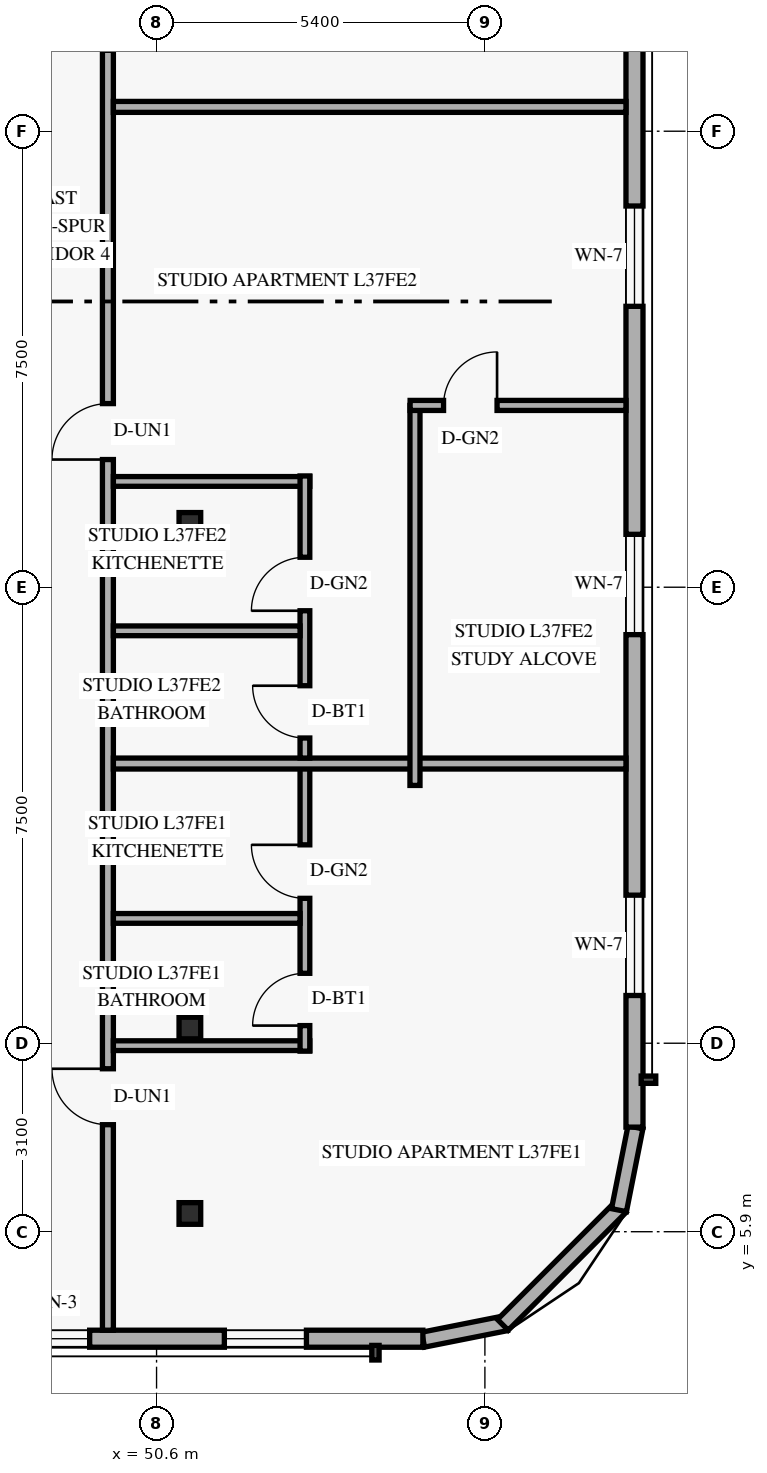
"""IFC4 building model, lengths in metres.
Left out: names, types, materials, properties, quantities, classifications, styles, units other than length and angle.
Written with IfcOpenShell. Run it as: python <this file> out.ifc"""

import sys

from ifc_helpers import new_model, si_unit, direction, frame, frame_2d, origin, origin_2d, place, context, subcontext, project, spatial, rectangle, hollow_rectangle, extrude, element, fill, save


model = new_model("IFC4")
c1 = context("Model", 3, precision=1e-05, world=origin(), true_north=direction((0.0, 1.0)))
c2 = subcontext(c1, "Body", "Model", "MODEL_VIEW")
j1 = project(units=[si_unit("LENGTHUNIT", "METRE"), si_unit("PLANEANGLEUNIT", "RADIAN")], contexts=[c1])
p1 = place(None, origin())
s1 = spatial("IfcSite", under=j1, at=p1, CompositionType="ELEMENT")
p2 = place(p1, origin())
s2 = spatial("IfcBuilding", under=s1, at=p2, CompositionType="ELEMENT")
p3 = place(p2, frame((0.0, 0.0, 144.6)))
s3 = spatial("IfcBuildingStorey", under=s2, at=p3, CompositionType="ELEMENT", Elevation=144.6)
for number, where, z_axis, x_axis in (
    (1, (51.044, 6.2, 0.0), (0.058, 0.0, 0.998), (0.0, 1.0, 0.0)),
    (2, (51.044, 9.25, 0.0), (0.058, 0.0, 0.998), (0.0, 1.0, 0.0)),
    (3, (51.044, 17.55, 0.0), (0.058, 0.0, 0.998), (0.0, 1.0, 0.0)),
):
    element("IfcColumn", number, at=place(p3, frame(where, z_axis=z_axis, x_axis=x_axis)), inside=s3, PredefinedType="COLUMN", context=c2, shape_type="SweptSolid", body=[
        extrude(hollow_rectangle(XDim=0.356, YDim=0.356, WallThickness=0.016, at=origin_2d()), origin(), (0.0, 0.0, 1.0), 3.606),
    ])
p4 = place(p3, frame((54.983, 4.124, 0.0), z_axis=(0.0, 0.0, 1.0), x_axis=(0.980809899341, 0.19496651342, 0.0)))
e4 = element("IfcWall", 4, at=p4, inside=s3, PredefinedType="SOLIDWALL", context=c2, shape_type="SweptSolid", body=[
    extrude(rectangle(XDim=1.389, YDim=0.25, at=frame_2d((0.694, 0.0))), origin(), (0.0, 0.0, 1.0), 3.36),
])
p5 = place(p3, frame((56.295, 4.368, 0.0), z_axis=(0.0, 0.0, 1.0), x_axis=(0.707106781187, 0.707106781187, 0.0)))
e5 = element("IfcWall", 5, at=p5, inside=s3, PredefinedType="SOLIDWALL", context=c2, shape_type="SweptSolid", body=[
    extrude(rectangle(XDim=2.739, YDim=0.25, at=frame_2d((1.37, 0.0))), origin(), (0.0, 0.0, 1.0), 3.36),
])
p6 = place(p3, frame((58.205, 6.254, 0.0), z_axis=(0.0, 0.0, 1.0), x_axis=(0.19496651342, 0.980809899341, 0.0)))
e6 = element("IfcWall", 6, at=p6, inside=s3, PredefinedType="SOLIDWALL", context=c2, shape_type="SweptSolid", body=[
    extrude(rectangle(XDim=1.389, YDim=0.25, at=frame_2d((0.694, 0.0))), origin(), (0.0, 0.0, 1.0), 3.36),
])
p7 = place(p3, frame((21.22, 4.14, 0.0), z_axis=(0.0, 0.0, 1.0), x_axis=(1.0, 0.0, 0.0)))
e7 = element("IfcWall", 7, at=p7, inside=s3, PredefinedType="SOLIDWALL", context=c2, shape_type="SweptSolid", body=[
    extrude(rectangle(XDim=33.76, YDim=0.28, at=frame_2d((16.88, 0.0))), origin(), (0.0, 0.0, 1.0), 3.36),
])
p8 = place(p7, frame((2.83, 0.0, 0.85)))
e8 = element("IfcOpeningElement", 8, at=p8, cuts=e7, PredefinedType="OPENING", context=c2, shape_type="SweptSolid", body=[
    extrude(rectangle(XDim=1.35, YDim=1.55, at=frame_2d((0.675, 0.775))), frame((0.0, 0.15, 0.0), z_axis=(0.0, -1.0, 0.0), x_axis=(1.0, 0.0, 0.0)), (0.0, 0.0, 1.0), 0.3),
])
p9 = place(p7, frame((9.715, 0.0, 0.85)))
e9 = element("IfcOpeningElement", 9, at=p9, cuts=e7, PredefinedType="OPENING", context=c2, shape_type="SweptSolid", body=[
    extrude(rectangle(XDim=1.35, YDim=1.55, at=frame_2d((0.675, 0.775))), frame((0.0, 0.15, 0.0), z_axis=(0.0, -1.0, 0.0), x_axis=(1.0, 0.0, 0.0)), (0.0, 0.0, 1.0), 0.3),
])
p10 = place(p7, frame((14.99, 0.0, 0.85)))
e10 = element("IfcOpeningElement", 10, at=p10, cuts=e7, PredefinedType="OPENING", context=c2, shape_type="SweptSolid", body=[
    extrude(rectangle(XDim=1.35, YDim=1.55, at=frame_2d((0.675, 0.775))), frame((0.0, 0.15, 0.0), z_axis=(0.0, -1.0, 0.0), x_axis=(1.0, 0.0, 0.0)), (0.0, 0.0, 1.0), 0.3),
])
p11 = place(p7, frame((19.55, 0.0, 0.85)))
e11 = element("IfcOpeningElement", 11, at=p11, cuts=e7, PredefinedType="OPENING", context=c2, shape_type="SweptSolid", body=[
    extrude(rectangle(XDim=1.35, YDim=1.55, at=frame_2d((0.675, 0.775))), frame((0.0, 0.15, 0.0), z_axis=(0.0, -1.0, 0.0), x_axis=(1.0, 0.0, 0.0)), (0.0, 0.0, 1.0), 0.3),
])
p12 = place(p7, frame((24.375, 0.0, 0.85)))
e12 = element("IfcOpeningElement", 12, at=p12, cuts=e7, PredefinedType="OPENING", context=c2, shape_type="SweptSolid", body=[
    extrude(rectangle(XDim=1.35, YDim=1.55, at=frame_2d((0.675, 0.775))), frame((0.0, 0.15, 0.0), z_axis=(0.0, -1.0, 0.0), x_axis=(1.0, 0.0, 0.0)), (0.0, 0.0, 1.0), 0.3),
])
p13 = place(p7, frame((27.08, 0.0, 0.85)))
e13 = element("IfcOpeningElement", 13, at=p13, cuts=e7, PredefinedType="OPENING", context=c2, shape_type="SweptSolid", body=[
    extrude(rectangle(XDim=1.2, YDim=1.5, at=frame_2d((0.6, 0.75))), frame((0.0, 0.15, 0.0), z_axis=(0.0, -1.0, 0.0), x_axis=(1.0, 0.0, 0.0)), (0.0, 0.0, 1.0), 0.3),
])
p14 = place(p7, frame((30.495, 0.0, 0.85)))
e14 = element("IfcOpeningElement", 14, at=p14, cuts=e7, PredefinedType="OPENING", context=c2, shape_type="SweptSolid", body=[
    extrude(rectangle(XDim=1.35, YDim=1.55, at=frame_2d((0.675, 0.775))), frame((0.0, 0.15, 0.0), z_axis=(0.0, -1.0, 0.0), x_axis=(1.0, 0.0, 0.0)), (0.0, 0.0, 1.0), 0.3),
])
p15 = place(p3, frame((58.46, 7.62, 0.0), z_axis=(0.0, 0.0, 1.0), x_axis=(0.0, 1.0, 0.0)))
e15 = element("IfcWall", 15, at=p15, inside=s3, PredefinedType="SOLIDWALL", context=c2, shape_type="SweptSolid", body=[
    extrude(rectangle(XDim=32.76, YDim=0.28, at=frame_2d((16.38, 0.0))), origin(), (0.0, 0.0, 1.0), 3.36),
])
p16 = place(p15, frame((2.165, 0.0, 0.85)))
e16 = element("IfcOpeningElement", 16, at=p16, cuts=e15, PredefinedType="OPENING", context=c2, shape_type="SweptSolid", body=[
    extrude(rectangle(XDim=1.65, YDim=1.6, at=frame_2d((0.825, 0.8))), frame((0.0, 0.15, 0.0), z_axis=(0.0, -1.0, 0.0), x_axis=(1.0, 0.0, 0.0)), (0.0, 0.0, 1.0), 0.3),
])
p17 = place(p15, frame((8.1, 0.0, 0.85)))
e17 = element("IfcOpeningElement", 17, at=p17, cuts=e15, PredefinedType="OPENING", context=c2, shape_type="SweptSolid", body=[
    extrude(rectangle(XDim=1.65, YDim=1.6, at=frame_2d((0.825, 0.8))), frame((0.0, 0.15, 0.0), z_axis=(0.0, -1.0, 0.0), x_axis=(1.0, 0.0, 0.0)), (0.0, 0.0, 1.0), 0.3),
])
p18 = place(p15, frame((13.5, 0.0, 0.85)))
e18 = element("IfcOpeningElement", 18, at=p18, cuts=e15, PredefinedType="OPENING", context=c2, shape_type="SweptSolid", body=[
    extrude(rectangle(XDim=1.65, YDim=1.6, at=frame_2d((0.825, 0.8))), frame((0.0, 0.15, 0.0), z_axis=(0.0, -1.0, 0.0), x_axis=(1.0, 0.0, 0.0)), (0.0, 0.0, 1.0), 0.3),
])
p19 = place(p15, frame((19.424, 0.0, 0.85)))
e19 = element("IfcOpeningElement", 19, at=p19, cuts=e15, PredefinedType="OPENING", context=c2, shape_type="SweptSolid", body=[
    extrude(rectangle(XDim=1.65, YDim=1.6, at=frame_2d((0.825, 0.8))), frame((0.0, 0.15, 0.0), z_axis=(0.0, -1.0, 0.0), x_axis=(1.0, 0.0, 0.0)), (0.0, 0.0, 1.0), 0.3),
])
p20 = place(p15, frame((24.624, 0.0, 0.85)))
e20 = element("IfcOpeningElement", 20, at=p20, cuts=e15, PredefinedType="OPENING", context=c2, shape_type="SweptSolid", body=[
    extrude(rectangle(XDim=1.65, YDim=1.6, at=frame_2d((0.825, 0.8))), frame((0.0, 0.15, 0.0), z_axis=(0.0, -1.0, 0.0), x_axis=(1.0, 0.0, 0.0)), (0.0, 0.0, 1.0), 0.3),
])
p21 = place(p15, frame((29.145, 0.0, 0.85)))
e21 = element("IfcOpeningElement", 21, at=p21, cuts=e15, PredefinedType="OPENING", context=c2, shape_type="SweptSolid", body=[
    extrude(rectangle(XDim=1.65, YDim=1.6, at=frame_2d((0.825, 0.8))), frame((0.0, 0.15, 0.0), z_axis=(0.0, -1.0, 0.0), x_axis=(1.0, 0.0, 0.0)), (0.0, 0.0, 1.0), 0.3),
])
p22 = place(p3, frame((49.8, 4.28, 0.0), z_axis=(0.0, 0.0, 1.0), x_axis=(0.0, 1.0, 0.0)))
e22 = element("IfcWall", 22, at=p22, inside=s3, PredefinedType="STANDARD", context=c2, shape_type="SweptSolid", body=[
    extrude(rectangle(XDim=39.44, YDim=0.18, at=frame_2d((19.72, 0.0))), origin(), (0.0, 0.0, 1.0), 2.73),
])
p23 = place(p22, frame((3.38, 0.0, 0.0)))
e23 = element("IfcOpeningElement", 23, at=p23, cuts=e22, PredefinedType="OPENING", context=c2, shape_type="SweptSolid", body=[
    extrude(rectangle(XDim=0.92, YDim=2.15, at=frame_2d((0.46, 1.075))), frame((0.0, 0.1, 0.0), z_axis=(0.0, -1.0, 0.0), x_axis=(1.0, 0.0, 0.0)), (0.0, 0.0, 1.0), 0.2),
])
p24 = place(p22, frame((14.32, 0.0, 0.0)))
e24 = element("IfcOpeningElement", 24, at=p24, cuts=e22, PredefinedType="OPENING", context=c2, shape_type="SweptSolid", body=[
    extrude(rectangle(XDim=0.92, YDim=2.15, at=frame_2d((0.46, 1.075))), frame((0.0, 0.1, 0.0), z_axis=(0.0, -1.0, 0.0), x_axis=(1.0, 0.0, 0.0)), (0.0, 0.0, 1.0), 0.2),
])
p25 = place(p22, frame((21.05, 0.0, 0.0)))
e25 = element("IfcOpeningElement", 25, at=p25, cuts=e22, PredefinedType="OPENING", context=c2, shape_type="SweptSolid", body=[
    extrude(rectangle(XDim=0.92, YDim=2.15, at=frame_2d((0.46, 1.075))), frame((0.0, 0.1, 0.0), z_axis=(0.0, -1.0, 0.0), x_axis=(1.0, 0.0, 0.0)), (0.0, 0.0, 1.0), 0.2),
])
p26 = place(p22, frame((35.42, 0.0, 0.0)))
e26 = element("IfcOpeningElement", 26, at=p26, cuts=e22, PredefinedType="OPENING", context=c2, shape_type="SweptSolid", body=[
    extrude(rectangle(XDim=0.92, YDim=2.15, at=frame_2d((0.46, 1.075))), frame((0.0, 0.1, 0.0), z_axis=(0.0, -1.0, 0.0), x_axis=(1.0, 0.0, 0.0)), (0.0, 0.0, 1.0), 0.2),
])
p27 = place(p3, frame((49.89, 8.96, 0.0), z_axis=(0.0, 0.0, 1.0), x_axis=(1.0, 0.0, 0.0)))
e27 = element("IfcWall", 27, at=p27, inside=s3, PredefinedType="PLUMBINGWALL", context=c2, shape_type="SweptSolid", body=[
    extrude(rectangle(XDim=3.23, YDim=0.16, at=frame_2d((1.615, 0.0))), origin(), (0.0, 0.0, 1.0), 2.879),
])
p28 = place(p3, frame((53.04, 8.87, 0.0), z_axis=(0.0, 0.0, 1.0), x_axis=(0.0, 1.0, 0.0)))
e28 = element("IfcWall", 28, at=p28, inside=s3, PredefinedType="PLUMBINGWALL", context=c2, shape_type="SweptSolid", body=[
    extrude(rectangle(XDim=4.73, YDim=0.16, at=frame_2d((2.365, 0.0))), origin(), (0.0, 0.0, 1.0), 3.36),
])
p29 = place(p28, frame((0.42, 0.0, 0.0)))
e29 = element("IfcOpeningElement", 29, at=p29, cuts=e28, PredefinedType="OPENING", context=c2, shape_type="SweptSolid", body=[
    extrude(rectangle(XDim=0.86, YDim=2.12, at=frame_2d((0.43, 1.06))), frame((0.0, 0.09, 0.0), z_axis=(0.0, -1.0, 0.0), x_axis=(1.0, 0.0, 0.0)), (0.0, 0.0, 1.0), 0.18),
])
p30 = place(p28, frame((2.513, 0.0, 0.0)))
e30 = element("IfcOpeningElement", 30, at=p30, cuts=e28, PredefinedType="OPENING", context=c2, shape_type="SweptSolid", body=[
    extrude(rectangle(XDim=0.88, YDim=2.12, at=frame_2d((0.44, 1.06))), frame((0.0, 0.09, 0.0), z_axis=(0.0, -1.0, 0.0), x_axis=(1.0, 0.0, 0.0)), (0.0, 0.0, 1.0), 0.18),
])
p31 = place(p3, frame((49.89, 11.053, 0.0), z_axis=(0.0, 0.0, 1.0), x_axis=(1.0, 0.0, 0.0)))
e31 = element("IfcWall", 31, at=p31, inside=s3, PredefinedType="PLUMBINGWALL", context=c2, shape_type="SweptSolid", body=[
    extrude(rectangle(XDim=3.07, YDim=0.16, at=frame_2d((1.535, 0.0))), origin(), (0.0, 0.0, 1.0), 2.879),
])
p32 = place(p3, frame((49.89, 13.6, 0.0), z_axis=(0.0, 0.0, 1.0), x_axis=(1.0, 0.0, 0.0)))
e32 = element("IfcWall", 32, at=p32, inside=s3, PredefinedType="PARTITIONING", context=c2, shape_type="SweptSolid", body=[
    extrude(rectangle(XDim=8.43, YDim=0.18, at=frame_2d((4.215, 0.0))), origin(), (0.0, 0.0, 1.0), 2.879),
])
p33 = place(p3, frame((49.89, 18.24, 0.0), z_axis=(0.0, 0.0, 1.0), x_axis=(1.0, 0.0, 0.0)))
e33 = element("IfcWall", 33, at=p33, inside=s3, PredefinedType="PLUMBINGWALL", context=c2, shape_type="SweptSolid", body=[
    extrude(rectangle(XDim=3.23, YDim=0.16, at=frame_2d((1.615, 0.0))), origin(), (0.0, 0.0, 1.0), 2.879),
])
p34 = place(p3, frame((53.04, 13.69, 0.0), z_axis=(0.0, 0.0, 1.0), x_axis=(0.0, 1.0, 0.0)))
e34 = element("IfcWall", 34, at=p34, inside=s3, PredefinedType="PLUMBINGWALL", context=c2, shape_type="SweptSolid", body=[
    extrude(rectangle(XDim=4.64, YDim=0.16, at=frame_2d((2.32, 0.0))), origin(), (0.0, 0.0, 1.0), 3.36),
])
p35 = place(p34, frame((0.33, 0.0, 0.0)))
e35 = element("IfcOpeningElement", 35, at=p35, cuts=e34, PredefinedType="OPENING", context=c2, shape_type="SweptSolid", body=[
    extrude(rectangle(XDim=0.86, YDim=2.12, at=frame_2d((0.43, 1.06))), frame((0.0, 0.09, 0.0), z_axis=(0.0, -1.0, 0.0), x_axis=(1.0, 0.0, 0.0)), (0.0, 0.0, 1.0), 0.18),
])
p36 = place(p34, frame((2.423, 0.0, 0.0)))
e36 = element("IfcOpeningElement", 36, at=p36, cuts=e34, PredefinedType="OPENING", context=c2, shape_type="SweptSolid", body=[
    extrude(rectangle(XDim=0.88, YDim=2.12, at=frame_2d((0.44, 1.06))), frame((0.0, 0.09, 0.0), z_axis=(0.0, -1.0, 0.0), x_axis=(1.0, 0.0, 0.0)), (0.0, 0.0, 1.0), 0.18),
])
p37 = place(p3, frame((49.89, 15.783, 0.0), z_axis=(0.0, 0.0, 1.0), x_axis=(1.0, 0.0, 0.0)))
e37 = element("IfcWall", 37, at=p37, inside=s3, PredefinedType="PLUMBINGWALL", context=c2, shape_type="SweptSolid", body=[
    extrude(rectangle(XDim=3.07, YDim=0.16, at=frame_2d((1.535, 0.0))), origin(), (0.0, 0.0, 1.0), 2.879),
])
p38 = place(p3, frame((54.85, 13.24, 0.0), z_axis=(0.0, 0.0, 1.0), x_axis=(0.0, 1.0, 0.0)))
e38 = element("IfcWall", 38, at=p38, inside=s3, PredefinedType="PARTITIONING", context=c2, shape_type="SweptSolid", body=[
    extrude(rectangle(XDim=6.25, YDim=0.165, at=frame_2d((3.125, 0.0))), origin(), (0.0, 0.0, 1.0), 3.36),
])
p39 = place(p3, frame((54.77, 19.49, 0.0), z_axis=(0.0, 0.0, 1.0), x_axis=(1.0, 0.0, 0.0)))
e39 = element("IfcWall", 39, at=p39, inside=s3, PredefinedType="PARTITIONING", context=c2, shape_type="SweptSolid", body=[
    extrude(rectangle(XDim=3.55, YDim=0.165, at=frame_2d((1.775, 0.0))), origin(), (0.0, 0.0, 1.0), 3.36),
])
p40 = place(p39, frame((0.55, 0.0, 0.0)))
e40 = element("IfcOpeningElement", 40, at=p40, cuts=e39, PredefinedType="OPENING", context=c2, shape_type="SweptSolid", body=[
    extrude(rectangle(XDim=0.88, YDim=2.12, at=frame_2d((0.44, 1.06))), frame((0.0, 0.093, 0.0), z_axis=(0.0, -1.0, 0.0), x_axis=(1.0, 0.0, 0.0)), (0.0, 0.0, 1.0), 0.185),
])
p41 = place(p3, frame((49.89, 24.4, 0.0), z_axis=(0.0, 0.0, 1.0), x_axis=(1.0, 0.0, 0.0)))
e41 = element("IfcWall", 41, at=p41, inside=s3, PredefinedType="PARTITIONING", context=c2, shape_type="SweptSolid", body=[
    extrude(rectangle(XDim=8.43, YDim=0.18, at=frame_2d((4.215, 0.0))), origin(), (0.0, 0.0, 1.0), 2.879),
])
p42 = place(p13, origin())
e42 = element("IfcWindow", 42, at=p42, inside=s3, PartitioningType="SINGLE_PANEL", PredefinedType="WINDOW", context=c2, shape_type="SweptSolid", body=[
    extrude(rectangle(XDim=1.2, YDim=1.5, at=frame_2d((0.6, 0.75))), frame((0.0, 0.03, 0.0), z_axis=(0.0, -1.0, 0.0), x_axis=(1.0, 0.0, 0.0)), (0.0, 0.0, 1.0), 0.06),
])
fill(e13, e42)
p43 = place(p14, origin())
e43 = element("IfcWindow", 43, at=p43, inside=s3, PartitioningType="SINGLE_PANEL", PredefinedType="WINDOW", context=c2, shape_type="SweptSolid", body=[
    extrude(rectangle(XDim=1.35, YDim=1.55, at=frame_2d((0.675, 0.775))), frame((0.0, 0.03, 0.0), z_axis=(0.0, -1.0, 0.0), x_axis=(1.0, 0.0, 0.0)), (0.0, 0.0, 1.0), 0.06),
])
fill(e14, e43)
p44 = place(p16, origin())
e44 = element("IfcWindow", 44, at=p44, inside=s3, PartitioningType="SINGLE_PANEL", PredefinedType="WINDOW", context=c2, shape_type="SweptSolid", body=[
    extrude(rectangle(XDim=1.65, YDim=1.6, at=frame_2d((0.825, 0.8))), frame((0.0, 0.03, 0.0), z_axis=(0.0, -1.0, 0.0), x_axis=(1.0, 0.0, 0.0)), (0.0, 0.0, 1.0), 0.06),
])
fill(e16, e44)
p45 = place(p17, origin())
e45 = element("IfcWindow", 45, at=p45, inside=s3, PartitioningType="SINGLE_PANEL", PredefinedType="WINDOW", context=c2, shape_type="SweptSolid", body=[
    extrude(rectangle(XDim=1.65, YDim=1.6, at=frame_2d((0.825, 0.8))), frame((0.0, 0.03, 0.0), z_axis=(0.0, -1.0, 0.0), x_axis=(1.0, 0.0, 0.0)), (0.0, 0.0, 1.0), 0.06),
])
fill(e17, e45)
p46 = place(p18, origin())
e46 = element("IfcWindow", 46, at=p46, inside=s3, PartitioningType="SINGLE_PANEL", PredefinedType="WINDOW", context=c2, shape_type="SweptSolid", body=[
    extrude(rectangle(XDim=1.65, YDim=1.6, at=frame_2d((0.825, 0.8))), frame((0.0, 0.03, 0.0), z_axis=(0.0, -1.0, 0.0), x_axis=(1.0, 0.0, 0.0)), (0.0, 0.0, 1.0), 0.06),
])
fill(e18, e46)
p47 = place(p23, origin())
e47 = element("IfcDoor", 47, at=p47, inside=s3, OperationType="SINGLE_SWING_RIGHT", PredefinedType="DOOR", context=c2, shape_type="SweptSolid", body=[
    extrude(rectangle(XDim=0.92, YDim=2.15, at=frame_2d((0.46, 1.075))), frame((0.0, 0.025, 0.0), z_axis=(0.0, -1.0, 0.0), x_axis=(1.0, 0.0, 0.0)), (0.0, 0.0, 1.0), 0.05),
])
fill(e23, e47)
p48 = place(p29, origin())
e48 = element("IfcDoor", 48, at=p48, inside=s3, OperationType="SINGLE_SWING_LEFT", PredefinedType="DOOR", context=c2, shape_type="SweptSolid", body=[
    extrude(rectangle(XDim=0.86, YDim=2.12, at=frame_2d((0.43, 1.06))), frame((0.0, 0.025, 0.0), z_axis=(0.0, -1.0, 0.0), x_axis=(1.0, 0.0, 0.0)), (0.0, 0.0, 1.0), 0.05),
])
fill(e29, e48)
p49 = place(p30, origin())
e49 = element("IfcDoor", 49, at=p49, inside=s3, OperationType="SINGLE_SWING_RIGHT", PredefinedType="DOOR", context=c2, shape_type="SweptSolid", body=[
    extrude(rectangle(XDim=0.88, YDim=2.12, at=frame_2d((0.44, 1.06))), frame((0.0, 0.025, 0.0), z_axis=(0.0, -1.0, 0.0), x_axis=(1.0, 0.0, 0.0)), (0.0, 0.0, 1.0), 0.05),
])
fill(e30, e49)
p50 = place(p40, origin())
e50 = element("IfcDoor", 50, at=p50, inside=s3, OperationType="SINGLE_SWING_RIGHT", PredefinedType="DOOR", context=c2, shape_type="SweptSolid", body=[
    extrude(rectangle(XDim=0.88, YDim=2.12, at=frame_2d((0.44, 1.06))), frame((0.0, 0.025, 0.0), z_axis=(0.0, -1.0, 0.0), x_axis=(1.0, 0.0, 0.0)), (0.0, 0.0, 1.0), 0.05),
])
fill(e40, e50)
p51 = place(p24, origin())
e51 = element("IfcDoor", 51, at=p51, inside=s3, OperationType="SINGLE_SWING_LEFT", PredefinedType="DOOR", context=c2, shape_type="SweptSolid", body=[
    extrude(rectangle(XDim=0.92, YDim=2.15, at=frame_2d((0.46, 1.075))), frame((0.0, 0.025, 0.0), z_axis=(0.0, -1.0, 0.0), x_axis=(1.0, 0.0, 0.0)), (0.0, 0.0, 1.0), 0.05),
])
fill(e24, e51)
p52 = place(p35, origin())
e52 = element("IfcDoor", 52, at=p52, inside=s3, OperationType="SINGLE_SWING_RIGHT", PredefinedType="DOOR", context=c2, shape_type="SweptSolid", body=[
    extrude(rectangle(XDim=0.86, YDim=2.12, at=frame_2d((0.43, 1.06))), frame((0.0, 0.025, 0.0), z_axis=(0.0, -1.0, 0.0), x_axis=(1.0, 0.0, 0.0)), (0.0, 0.0, 1.0), 0.05),
])
fill(e35, e52)
p53 = place(p36, origin())
e53 = element("IfcDoor", 53, at=p53, inside=s3, OperationType="SINGLE_SWING_LEFT", PredefinedType="DOOR", context=c2, shape_type="SweptSolid", body=[
    extrude(rectangle(XDim=0.88, YDim=2.12, at=frame_2d((0.44, 1.06))), frame((0.0, 0.025, 0.0), z_axis=(0.0, -1.0, 0.0), x_axis=(1.0, 0.0, 0.0)), (0.0, 0.0, 1.0), 0.05),
])
fill(e36, e53)
save(model, sys.argv[1])
